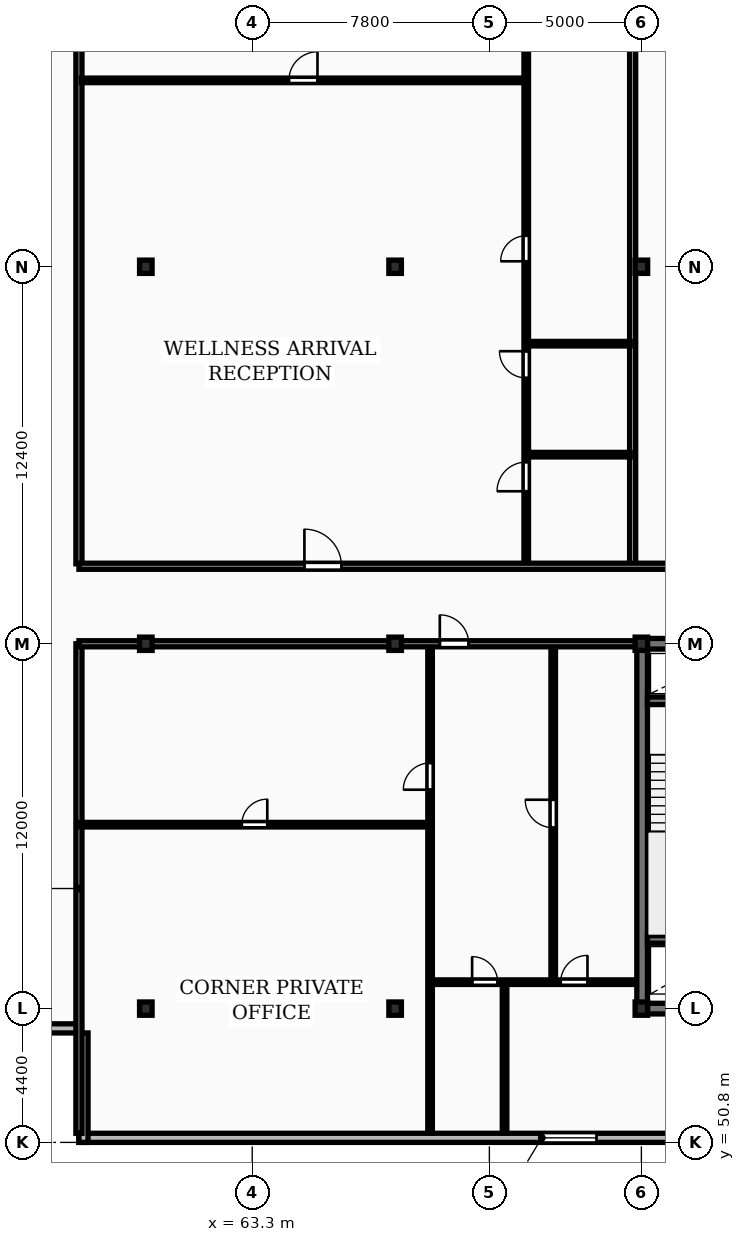
"""IFC4 building model, lengths in metres.
Left out: names, types, materials, properties, quantities, classifications, styles, units other than length and angle.
Written with IfcOpenShell. Run it as: python <this file> out.ifc"""

import sys

from ifc_helpers import new_model, si_unit, direction, frame, frame_2d, origin, origin_2d, place, context, subcontext, project, spatial, rectangle, i_section, extrude, element, fill, save


model = new_model("IFC4")
c1 = context("Model", 3, precision=1e-05, world=origin(), true_north=direction((0.0, 1.0)))
c2 = subcontext(c1, "Body", "Model", "MODEL_VIEW")
j1 = project(units=[si_unit("LENGTHUNIT", "METRE"), si_unit("PLANEANGLEUNIT", "RADIAN")], contexts=[c1])
p1 = place(None, origin())
s1 = spatial("IfcSite", under=j1, at=p1, CompositionType="ELEMENT")
p2 = place(p1, origin())
s2 = spatial("IfcBuilding", under=s1, at=p2, CompositionType="ELEMENT")
p3 = place(p2, frame((0.0, 0.0, 153.7)))
s3 = spatial("IfcBuildingStorey", under=s2, at=p3, CompositionType="ELEMENT", Elevation=153.7)
for number, where, z_axis, x_axis in (
    (1, (59.8, 55.2, 0.0), (0.0, 0.0, 1.0), (1.0, 0.0, 0.0)),
    (2, (59.8, 67.2, 0.0), (0.0, 0.0, 1.0), (1.0, 0.0, 0.0)),
    (3, (59.8, 79.6, 0.0), (0.0, 0.0, 1.0), (1.0, 0.0, 0.0)),
    (4, (68.0, 55.2, 0.0), (0.0, 0.0, 1.0), (1.0, 0.0, 0.0)),
    (5, (68.0, 67.2, 0.0), (0.0, 0.0, 1.0), (1.0, 0.0, 0.0)),
    (6, (68.0, 79.6, 0.0), (0.0, 0.0, 1.0), (1.0, 0.0, 0.0)),
    (7, (76.1, 55.2, 0.0), (0.0, 0.0, 1.0), (1.0, 0.0, 0.0)),
    (8, (76.1, 67.2, 0.0), (0.0, 0.0, 1.0), (1.0, 0.0, 0.0)),
    (9, (76.1, 79.6, 0.0), (0.0, 0.0, 1.0), (1.0, 0.0, 0.0)),
):
    element("IfcColumn", number, at=place(p3, frame(where, z_axis=z_axis, x_axis=x_axis)), inside=s3, PredefinedType="COLUMN", context=c2, shape_type="SweptSolid", body=[
        extrude(i_section(OverallWidth=0.412, OverallDepth=0.437, WebThickness=0.036, FlangeThickness=0.052, FilletRadius=0.015, at=origin_2d()), origin(), (0.0, 0.0, 1.0), 3.6),
    ])
p4 = place(p3, frame((57.6, 50.95, 0.0), z_axis=(0.0, 0.0, 1.0), x_axis=(1.0, 0.0, 0.0)))
e10 = element("IfcWall", 10, at=p4, inside=s3, PredefinedType="STANDARD", context=c2, shape_type="SweptSolid", body=[
    extrude(rectangle(XDim=73.0, YDim=0.3, at=frame_2d((36.5, 0.0))), origin(), (0.0, 0.0, 1.0), 3.32),
])
p5 = place(p4, frame((15.225, 0.0, 0.85)))
e11 = element("IfcOpeningElement", 11, at=p5, cuts=e10, PredefinedType="OPENING", context=c2, shape_type="SweptSolid", body=[
    extrude(rectangle(XDim=1.8, YDim=1.8, at=frame_2d((0.9, 0.9))), frame((0.0, 0.16, 0.0), z_axis=(0.0, -1.0, 0.0), x_axis=(1.0, 0.0, 0.0)), (0.0, 0.0, 1.0), 0.32),
])
p6 = place(p4, frame((58.575, 0.0, 0.85)))
e12 = element("IfcOpeningElement", 12, at=p6, cuts=e10, PredefinedType="OPENING", context=c2, shape_type="SweptSolid", body=[
    extrude(rectangle(XDim=1.8, YDim=1.8, at=frame_2d((0.9, 0.9))), frame((0.0, 0.16, 0.0), z_axis=(0.0, -1.0, 0.0), x_axis=(1.0, 0.0, 0.0)), (0.0, 0.0, 1.0), 0.32),
])
p7 = place(p4, frame((33.45, 0.0, 0.0)))
e13 = element("IfcOpeningElement", 13, at=p7, cuts=e10, PredefinedType="OPENING", context=c2, shape_type="SweptSolid", body=[
    extrude(rectangle(XDim=1.1, YDim=2.1, at=frame_2d((0.55, 1.05))), frame((0.0, 0.16, 0.0), z_axis=(0.0, -1.0, 0.0), x_axis=(1.0, 0.0, 0.0)), (0.0, 0.0, 1.0), 0.32),
])
p8 = place(p3, frame((54.0, 54.55, 0.0), z_axis=(0.0, 0.0, 1.0), x_axis=(1.0, 0.0, 0.0)))
e14 = element("IfcWall", 14, at=p8, inside=s3, PredefinedType="STANDARD", context=c2, shape_type="SweptSolid", body=[
    extrude(rectangle(XDim=3.6, YDim=0.3, at=frame_2d((1.8, 0.0))), origin(), (0.0, 0.0, 1.0), 3.32),
])
p9 = place(p3, frame((57.75, 54.4, 0.0), z_axis=(0.0, 0.0, 1.0), x_axis=(0.0, -1.0, 0.0)))
e15 = element("IfcWall", 15, at=p9, inside=s3, PredefinedType="STANDARD", context=c2, shape_type="SweptSolid", body=[
    extrude(rectangle(XDim=3.6, YDim=0.3, at=frame_2d((1.8, 0.0))), origin(), (0.0, 0.0, 1.0), 3.32),
])
p10 = place(p3, frame((75.95, 55.2, 0.0), z_axis=(0.0, 0.0, 1.0), x_axis=(1.0, 0.0, 0.0)))
e16 = element("IfcWall", 16, at=p10, inside=s3, PredefinedType="SHEAR", context=c2, shape_type="SweptSolid", body=[
    extrude(rectangle(XDim=36.3, YDim=0.35, at=frame_2d((18.15, 0.0))), origin(), (0.0, 0.0, 1.0), 3.6),
])
p11 = place(p10, frame((15.1, 0.0, 0.0)))
e17 = element("IfcOpeningElement", 17, at=p11, cuts=e16, PredefinedType="OPENING", context=c2, shape_type="SweptSolid", body=[
    extrude(rectangle(XDim=1.1, YDim=2.1, at=frame_2d((0.55, 1.05))), frame((0.0, 0.185, 0.0), z_axis=(0.0, -1.0, 0.0), x_axis=(1.0, 0.0, 0.0)), (0.0, 0.0, 1.0), 0.37),
])
p12 = place(p3, frame((76.125, 55.375, 0.0), z_axis=(0.0, 0.0, 1.0), x_axis=(0.0, 1.0, 0.0)))
e18 = element("IfcWall", 18, at=p12, inside=s3, PredefinedType="SHEAR", context=c2, shape_type="SweptSolid", body=[
    extrude(rectangle(XDim=11.65, YDim=0.35, at=frame_2d((5.825, 0.0))), origin(), (0.0, 0.0, 1.0), 3.6),
])
p13 = place(p3, frame((75.95, 67.2, 0.0), z_axis=(0.0, 0.0, 1.0), x_axis=(1.0, 0.0, 0.0)))
e19 = element("IfcWall", 19, at=p13, inside=s3, PredefinedType="SHEAR", context=c2, shape_type="SweptSolid", body=[
    extrude(rectangle(XDim=36.3, YDim=0.35, at=frame_2d((18.15, 0.0))), origin(), (0.0, 0.0, 1.0), 3.6),
])
p14 = place(p13, frame((5.25, 0.0, 0.0)))
e20 = element("IfcOpeningElement", 20, at=p14, cuts=e19, PredefinedType="OPENING", context=c2, shape_type="SweptSolid", body=[
    extrude(rectangle(XDim=1.0, YDim=2.15, at=frame_2d((0.5, 1.075))), frame((0.0, 0.185, 0.0), z_axis=(0.0, -1.0, 0.0), x_axis=(1.0, 0.0, 0.0)), (0.0, 0.0, 1.0), 0.37),
])
p15 = place(p13, frame((21.6, 0.0, 0.0)))
e21 = element("IfcOpeningElement", 21, at=p15, cuts=e19, PredefinedType="OPENING", context=c2, shape_type="SweptSolid", body=[
    extrude(rectangle(XDim=1.5, YDim=2.2, at=frame_2d((0.75, 1.1))), frame((0.0, 0.185, 0.0), z_axis=(0.0, -1.0, 0.0), x_axis=(1.0, 0.0, 0.0)), (0.0, 0.0, 1.0), 0.37),
])
p16 = place(p13, frame((30.45, 0.0, 0.0)))
e22 = element("IfcOpeningElement", 22, at=p16, cuts=e19, PredefinedType="OPENING", context=c2, shape_type="SweptSolid", body=[
    extrude(rectangle(XDim=1.0, YDim=2.15, at=frame_2d((0.5, 1.075))), frame((0.0, 0.185, 0.0), z_axis=(0.0, -1.0, 0.0), x_axis=(1.0, 0.0, 0.0)), (0.0, 0.0, 1.0), 0.37),
])
for number, where, z_axis, x_axis in (
    (23, (76.3, 57.475, 0.0), (0.0, 0.0, 1.0), (1.0, 0.0, 0.0)),
    (24, (76.3, 65.325, 0.0), (0.0, 0.0, 1.0), (1.0, 0.0, 0.0)),
):
    element("IfcWall", number, at=place(p3, frame(where, z_axis=z_axis, x_axis=x_axis)), inside=s3, PredefinedType="SHEAR", context=c2, shape_type="SweptSolid", body=[
        extrude(rectangle(XDim=3.24, YDim=0.25, at=frame_2d((1.62, 0.0))), origin(), (0.0, 0.0, 1.0), 3.6),
    ])
p17 = place(p3, frame((57.6, 51.1, 0.0), z_axis=(0.0, 0.0, 1.0), x_axis=(0.0, 1.0, 0.0)))
e25 = element("IfcWall", 25, at=p17, inside=s3, PredefinedType="PARTITIONING", context=c2, shape_type="SweptSolid", body=[
    extrude(rectangle(XDim=16.1, YDim=0.2, at=frame_2d((8.05, 0.0))), origin(), (0.0, 0.0, 1.0), 3.32),
])
p18 = place(p3, frame((57.6, 61.25, 0.0), z_axis=(0.0, 0.0, 1.0), x_axis=(1.0, 0.0, 0.0)))
e26 = element("IfcWall", 26, at=p18, inside=s3, PredefinedType="PARTITIONING", context=c2, shape_type="SweptSolid", body=[
    extrude(rectangle(XDim=11.55, YDim=0.15, at=frame_2d((5.775, 0.0))), origin(), (0.0, 0.0, 1.0), 3.32),
])
p19 = place(p18, frame((5.355, 0.0, 0.0)))
e27 = element("IfcOpeningElement", 27, at=p19, cuts=e26, PredefinedType="OPENING", context=c2, shape_type="SweptSolid", body=[
    extrude(rectangle(XDim=0.84, YDim=2.04, at=frame_2d((0.42, 1.02))), frame((0.0, 0.085, 0.0), z_axis=(0.0, -1.0, 0.0), x_axis=(1.0, 0.0, 0.0)), (0.0, 0.0, 1.0), 0.17),
])
p20 = place(p3, frame((69.15, 51.1, 0.0), z_axis=(0.0, 0.0, 1.0), x_axis=(0.0, 1.0, 0.0)))
e28 = element("IfcWall", 28, at=p20, inside=s3, PredefinedType="PARTITIONING", context=c2, shape_type="SweptSolid", body=[
    extrude(rectangle(XDim=16.05, YDim=0.15, at=frame_2d((8.025, 0.0))), origin(), (0.0, 0.0, 1.0), 3.32),
])
p21 = place(p20, frame((11.3, 0.0, 0.0)))
e29 = element("IfcOpeningElement", 29, at=p21, cuts=e28, PredefinedType="OPENING", context=c2, shape_type="SweptSolid", body=[
    extrude(rectangle(XDim=0.88, YDim=2.06, at=frame_2d((0.44, 1.03))), frame((0.0, 0.085, 0.0), z_axis=(0.0, -1.0, 0.0), x_axis=(1.0, 0.0, 0.0)), (0.0, 0.0, 1.0), 0.17),
])
p22 = place(p3, frame((73.2, 56.07, 0.0), z_axis=(0.0, 0.0, 1.0), x_axis=(0.0, 1.0, 0.0)))
e30 = element("IfcWall", 30, at=p22, inside=s3, PredefinedType="PARTITIONING", context=c2, shape_type="SweptSolid", body=[
    extrude(rectangle(XDim=11.08, YDim=0.15, at=frame_2d((5.54, 0.0))), origin(), (0.0, 0.0, 1.0), 3.32),
])
p23 = place(p22, frame((5.08, 0.0, 0.0)))
e31 = element("IfcOpeningElement", 31, at=p23, cuts=e30, PredefinedType="OPENING", context=c2, shape_type="SweptSolid", body=[
    extrude(rectangle(XDim=0.92, YDim=2.08, at=frame_2d((0.46, 1.04))), frame((0.0, 0.085, 0.0), z_axis=(0.0, -1.0, 0.0), x_axis=(1.0, 0.0, 0.0)), (0.0, 0.0, 1.0), 0.17),
])
p24 = place(p3, frame((71.6, 51.1, 0.0), z_axis=(0.0, 0.0, 1.0), x_axis=(0.0, 1.0, 0.0)))
e32 = element("IfcWall", 32, at=p24, inside=s3, PredefinedType="PARTITIONING", context=c2, shape_type="SweptSolid", body=[
    extrude(rectangle(XDim=4.97, YDim=0.15, at=frame_2d((2.485, 0.0))), origin(), (0.0, 0.0, 1.0), 3.32),
])
p25 = place(p3, frame((69.17, 56.07, 0.0), z_axis=(0.0, 0.0, 1.0), x_axis=(1.0, 0.0, 0.0)))
e33 = element("IfcWall", 33, at=p25, inside=s3, PredefinedType="PARTITIONING", context=c2, shape_type="SweptSolid", body=[
    extrude(rectangle(XDim=6.76, YDim=0.15, at=frame_2d((3.38, 0.0))), origin(), (0.0, 0.0, 1.0), 3.32),
])
p26 = place(p25, frame((1.362, 0.0, 0.0)))
e34 = element("IfcOpeningElement", 34, at=p26, cuts=e33, PredefinedType="OPENING", context=c2, shape_type="SweptSolid", body=[
    extrude(rectangle(XDim=0.84, YDim=2.04, at=frame_2d((0.42, 1.02))), frame((0.0, 0.085, 0.0), z_axis=(0.0, -1.0, 0.0), x_axis=(1.0, 0.0, 0.0)), (0.0, 0.0, 1.0), 0.17),
])
p27 = place(p25, frame((4.277, 0.0, 0.0)))
e35 = element("IfcOpeningElement", 35, at=p27, cuts=e33, PredefinedType="OPENING", context=c2, shape_type="SweptSolid", body=[
    extrude(rectangle(XDim=0.88, YDim=2.06, at=frame_2d((0.44, 1.03))), frame((0.0, 0.085, 0.0), z_axis=(0.0, -1.0, 0.0), x_axis=(1.0, 0.0, 0.0)), (0.0, 0.0, 1.0), 0.17),
])
p28 = place(p3, frame((57.6, 67.2, 0.0), z_axis=(0.0, 0.0, 1.0), x_axis=(1.0, 0.0, 0.0)))
e36 = element("IfcWall", 36, at=p28, inside=s3, PredefinedType="PARTITIONING", context=c2, shape_type="SweptSolid", body=[
    extrude(rectangle(XDim=18.35, YDim=0.2, at=frame_2d((9.175, 0.0))), origin(), (0.0, 0.0, 1.0), 2.783),
])
p29 = place(p28, frame((11.87, 0.0, 0.0)))
e37 = element("IfcOpeningElement", 37, at=p29, cuts=e36, PredefinedType="OPENING", context=c2, shape_type="SweptSolid", body=[
    extrude(rectangle(XDim=0.95, YDim=2.15, at=frame_2d((0.475, 1.075))), frame((0.0, 0.11, 0.0), z_axis=(0.0, -1.0, 0.0), x_axis=(1.0, 0.0, 0.0)), (0.0, 0.0, 1.0), 0.22),
])
p30 = place(p3, frame((57.6, 69.83, 0.0), z_axis=(0.0, 0.0, 1.0), x_axis=(0.0, 1.0, 0.0)))
e38 = element("IfcWall", 38, at=p30, inside=s3, PredefinedType="PARTITIONING", context=c2, shape_type="SweptSolid", body=[
    extrude(rectangle(XDim=26.07, YDim=0.2, at=frame_2d((13.035, 0.0))), origin(), (0.0, 0.0, 1.0), 3.32),
])
p31 = place(p3, frame((75.812, 69.83, 0.0), z_axis=(0.0, 0.0, 1.0), x_axis=(0.0, 1.0, 0.0)))
e39 = element("IfcWall", 39, at=p31, inside=s3, PredefinedType="PARTITIONING", context=c2, shape_type="SweptSolid", body=[
    extrude(rectangle(XDim=26.07, YDim=0.2, at=frame_2d((13.035, 0.0))), origin(), (0.0, 0.0, 1.0), 2.627),
])
p32 = place(p3, frame((57.68, 85.73, 0.0), z_axis=(0.0, 0.0, 1.0), x_axis=(1.0, 0.0, 0.0)))
e40 = element("IfcWall", 40, at=p32, inside=s3, PredefinedType="PARTITIONING", context=c2, shape_type="SweptSolid", body=[
    extrude(rectangle(XDim=14.593, YDim=0.15, at=frame_2d((7.296, 0.0))), origin(), (0.0, 0.0, 1.0), 3.32),
])
p33 = place(p32, frame((6.826, 0.0, 0.0)))
e41 = element("IfcOpeningElement", 41, at=p33, cuts=e40, PredefinedType="OPENING", context=c2, shape_type="SweptSolid", body=[
    extrude(rectangle(XDim=0.94, YDim=2.1, at=frame_2d((0.47, 1.05))), frame((0.0, 0.085, 0.0), z_axis=(0.0, -1.0, 0.0), x_axis=(1.0, 0.0, 0.0)), (0.0, 0.0, 1.0), 0.17),
])
for number, where, z_axis, x_axis in (
    (42, (72.373, 73.42, 0.0), (0.0, 0.0, 1.0), (1.0, 0.0, 0.0)),
    (43, (72.373, 77.07, 0.0), (0.0, 0.0, 1.0), (1.0, 0.0, 0.0)),
):
    element("IfcWall", number, at=place(p3, frame(where, z_axis=z_axis, x_axis=x_axis)), inside=s3, PredefinedType="PARTITIONING", context=c2, shape_type="SweptSolid", body=[
        extrude(rectangle(XDim=3.36, YDim=0.15, at=frame_2d((1.68, 0.0))), origin(), (0.0, 0.0, 1.0), 3.32),
    ])
p34 = place(p3, frame((72.312, 69.81, 0.0), z_axis=(0.0, 0.0, 1.0), x_axis=(0.0, 1.0, 0.0)))
e44 = element("IfcWall", 44, at=p34, inside=s3, PredefinedType="PARTITIONING", context=c2, shape_type="SweptSolid", body=[
    extrude(rectangle(XDim=20.78, YDim=0.15, at=frame_2d((10.39, 0.0))), origin(), (0.0, 0.0, 1.0), 3.32),
])
p35 = place(p34, frame((2.406, 0.0, 0.0)))
e45 = element("IfcOpeningElement", 45, at=p35, cuts=e44, PredefinedType="OPENING", context=c2, shape_type="SweptSolid", body=[
    extrude(rectangle(XDim=0.96, YDim=2.1, at=frame_2d((0.48, 1.05))), frame((0.0, 0.085, 0.0), z_axis=(0.0, -1.0, 0.0), x_axis=(1.0, 0.0, 0.0)), (0.0, 0.0, 1.0), 0.17),
])
p36 = place(p34, frame((6.133, 0.0, 0.0)))
e46 = element("IfcOpeningElement", 46, at=p36, cuts=e44, PredefinedType="OPENING", context=c2, shape_type="SweptSolid", body=[
    extrude(rectangle(XDim=0.88, YDim=2.06, at=frame_2d((0.44, 1.03))), frame((0.0, 0.085, 0.0), z_axis=(0.0, -1.0, 0.0), x_axis=(1.0, 0.0, 0.0)), (0.0, 0.0, 1.0), 0.17),
])
p37 = place(p34, frame((9.97, 0.0, 0.0)))
e47 = element("IfcOpeningElement", 47, at=p37, cuts=e44, PredefinedType="OPENING", context=c2, shape_type="SweptSolid", body=[
    extrude(rectangle(XDim=0.84, YDim=2.04, at=frame_2d((0.42, 1.02))), frame((0.0, 0.085, 0.0), z_axis=(0.0, -1.0, 0.0), x_axis=(1.0, 0.0, 0.0)), (0.0, 0.0, 1.0), 0.17),
])
p38 = place(p3, frame((57.6, 69.75, 0.0), z_axis=(0.0, 0.0, 1.0), x_axis=(1.0, 0.0, 0.0)))
e48 = element("IfcWall", 48, at=p38, inside=s3, PredefinedType="PARTITIONING", context=c2, shape_type="SweptSolid", body=[
    extrude(rectangle(XDim=73.0, YDim=0.2, at=frame_2d((36.5, 0.0))), origin(), (0.0, 0.0, 1.0), 3.32),
])
p39 = place(p38, frame((7.416, 0.0, 0.0)))
e49 = element("IfcOpeningElement", 49, at=p39, cuts=e48, PredefinedType="OPENING", context=c2, shape_type="SweptSolid", body=[
    extrude(rectangle(XDim=1.22, YDim=2.18, at=frame_2d((0.61, 1.09))), frame((0.0, 0.11, 0.0), z_axis=(0.0, -1.0, 0.0), x_axis=(1.0, 0.0, 0.0)), (0.0, 0.0, 1.0), 0.22),
])
p40 = place(p38, frame((26.456, 0.0, 0.0)))
e50 = element("IfcOpeningElement", 50, at=p40, cuts=e48, PredefinedType="OPENING", context=c2, shape_type="SweptSolid", body=[
    extrude(rectangle(XDim=1.22, YDim=2.18, at=frame_2d((0.61, 1.09))), frame((0.0, 0.11, 0.0), z_axis=(0.0, -1.0, 0.0), x_axis=(1.0, 0.0, 0.0)), (0.0, 0.0, 1.0), 0.22),
])
p41 = place(p38, frame((44.81, 0.0, 0.0)))
e51 = element("IfcOpeningElement", 51, at=p41, cuts=e48, PredefinedType="OPENING", context=c2, shape_type="SweptSolid", body=[
    extrude(rectangle(XDim=1.22, YDim=2.18, at=frame_2d((0.61, 1.09))), frame((0.0, 0.11, 0.0), z_axis=(0.0, -1.0, 0.0), x_axis=(1.0, 0.0, 0.0)), (0.0, 0.0, 1.0), 0.22),
])
p42 = place(p38, frame((57.195, 0.0, 0.0)))
e52 = element("IfcOpeningElement", 52, at=p42, cuts=e48, PredefinedType="OPENING", context=c2, shape_type="SweptSolid", body=[
    extrude(rectangle(XDim=0.95, YDim=2.15, at=frame_2d((0.475, 1.075))), frame((0.0, 0.11, 0.0), z_axis=(0.0, -1.0, 0.0), x_axis=(1.0, 0.0, 0.0)), (0.0, 0.0, 1.0), 0.22),
])
p43 = place(p5, origin())
e53 = element("IfcWindow", 53, at=p43, inside=s3, PartitioningType="SINGLE_PANEL", PredefinedType="WINDOW", context=c2, shape_type="SweptSolid", body=[
    extrude(rectangle(XDim=1.8, YDim=1.8, at=frame_2d((0.9, 0.9))), frame((0.0, 0.03, 0.0), z_axis=(0.0, -1.0, 0.0), x_axis=(1.0, 0.0, 0.0)), (0.0, 0.0, 1.0), 0.06),
])
fill(e11, e53)
p44 = place(p19, origin())
e54 = element("IfcDoor", 54, at=p44, inside=s3, OperationType="SINGLE_SWING_RIGHT", PredefinedType="DOOR", context=c2, shape_type="SweptSolid", body=[
    extrude(rectangle(XDim=0.84, YDim=2.04, at=frame_2d((0.42, 1.02))), frame((0.0, 0.025, 0.0), z_axis=(0.0, -1.0, 0.0), x_axis=(1.0, 0.0, 0.0)), (0.0, 0.0, 1.0), 0.05),
])
fill(e27, e54)
p45 = place(p21, origin())
e55 = element("IfcDoor", 55, at=p45, inside=s3, OperationType="SINGLE_SWING_LEFT", PredefinedType="DOOR", context=c2, shape_type="SweptSolid", body=[
    extrude(rectangle(XDim=0.88, YDim=2.06, at=frame_2d((0.44, 1.03))), frame((0.0, 0.025, 0.0), z_axis=(0.0, -1.0, 0.0), x_axis=(1.0, 0.0, 0.0)), (0.0, 0.0, 1.0), 0.05),
])
fill(e29, e55)
p46 = place(p23, origin())
e56 = element("IfcDoor", 56, at=p46, inside=s3, OperationType="SINGLE_SWING_RIGHT", PredefinedType="DOOR", context=c2, shape_type="SweptSolid", body=[
    extrude(rectangle(XDim=0.92, YDim=2.08, at=frame_2d((0.46, 1.04))), frame((0.0, 0.025, 0.0), z_axis=(0.0, -1.0, 0.0), x_axis=(1.0, 0.0, 0.0)), (0.0, 0.0, 1.0), 0.05),
])
fill(e31, e56)
p47 = place(p26, origin())
e57 = element("IfcDoor", 57, at=p47, inside=s3, OperationType="SINGLE_SWING_LEFT", PredefinedType="DOOR", context=c2, shape_type="SweptSolid", body=[
    extrude(rectangle(XDim=0.84, YDim=2.04, at=frame_2d((0.42, 1.02))), frame((0.0, 0.025, 0.0), z_axis=(0.0, -1.0, 0.0), x_axis=(1.0, 0.0, 0.0)), (0.0, 0.0, 1.0), 0.05),
])
fill(e34, e57)
p48 = place(p27, origin())
e58 = element("IfcDoor", 58, at=p48, inside=s3, OperationType="SINGLE_SWING_RIGHT", PredefinedType="DOOR", context=c2, shape_type="SweptSolid", body=[
    extrude(rectangle(XDim=0.88, YDim=2.06, at=frame_2d((0.44, 1.03))), frame((0.0, 0.025, 0.0), z_axis=(0.0, -1.0, 0.0), x_axis=(1.0, 0.0, 0.0)), (0.0, 0.0, 1.0), 0.05),
])
fill(e35, e58)
p49 = place(p29, origin())
e59 = element("IfcDoor", 59, at=p49, inside=s3, OperationType="SINGLE_SWING_LEFT", PredefinedType="DOOR", context=c2, shape_type="SweptSolid", body=[
    extrude(rectangle(XDim=0.95, YDim=2.15, at=frame_2d((0.475, 1.075))), frame((0.0, 0.025, 0.0), z_axis=(0.0, -1.0, 0.0), x_axis=(1.0, 0.0, 0.0)), (0.0, 0.0, 1.0), 0.05),
])
fill(e37, e59)
p50 = place(p33, origin())
e60 = element("IfcDoor", 60, at=p50, inside=s3, OperationType="SINGLE_SWING_RIGHT", PredefinedType="DOOR", context=c2, shape_type="SweptSolid", body=[
    extrude(rectangle(XDim=0.94, YDim=2.1, at=frame_2d((0.47, 1.05))), frame((0.0, 0.025, 0.0), z_axis=(0.0, -1.0, 0.0), x_axis=(1.0, 0.0, 0.0)), (0.0, 0.0, 1.0), 0.05),
])
fill(e41, e60)
p51 = place(p35, origin())
e61 = element("IfcDoor", 61, at=p51, inside=s3, OperationType="SINGLE_SWING_LEFT", PredefinedType="DOOR", context=c2, shape_type="SweptSolid", body=[
    extrude(rectangle(XDim=0.96, YDim=2.1, at=frame_2d((0.48, 1.05))), frame((0.0, 0.025, 0.0), z_axis=(0.0, -1.0, 0.0), x_axis=(1.0, 0.0, 0.0)), (0.0, 0.0, 1.0), 0.05),
])
fill(e45, e61)
p52 = place(p36, origin())
e62 = element("IfcDoor", 62, at=p52, inside=s3, OperationType="SINGLE_SWING_RIGHT", PredefinedType="DOOR", context=c2, shape_type="SweptSolid", body=[
    extrude(rectangle(XDim=0.88, YDim=2.06, at=frame_2d((0.44, 1.03))), frame((0.0, 0.025, 0.0), z_axis=(0.0, -1.0, 0.0), x_axis=(1.0, 0.0, 0.0)), (0.0, 0.0, 1.0), 0.05),
])
fill(e46, e62)
p53 = place(p37, origin())
e63 = element("IfcDoor", 63, at=p53, inside=s3, OperationType="SINGLE_SWING_LEFT", PredefinedType="DOOR", context=c2, shape_type="SweptSolid", body=[
    extrude(rectangle(XDim=0.84, YDim=2.04, at=frame_2d((0.42, 1.02))), frame((0.0, 0.025, 0.0), z_axis=(0.0, -1.0, 0.0), x_axis=(1.0, 0.0, 0.0)), (0.0, 0.0, 1.0), 0.05),
])
fill(e47, e63)
p54 = place(p39, origin())
e64 = element("IfcDoor", 64, at=p54, inside=s3, OperationType="SINGLE_SWING_LEFT", PredefinedType="DOOR", context=c2, shape_type="SweptSolid", body=[
    extrude(rectangle(XDim=1.22, YDim=2.18, at=frame_2d((0.61, 1.09))), frame((0.0, 0.025, 0.0), z_axis=(0.0, -1.0, 0.0), x_axis=(1.0, 0.0, 0.0)), (0.0, 0.0, 1.0), 0.05),
])
fill(e49, e64)
save(model, sys.argv[1])
